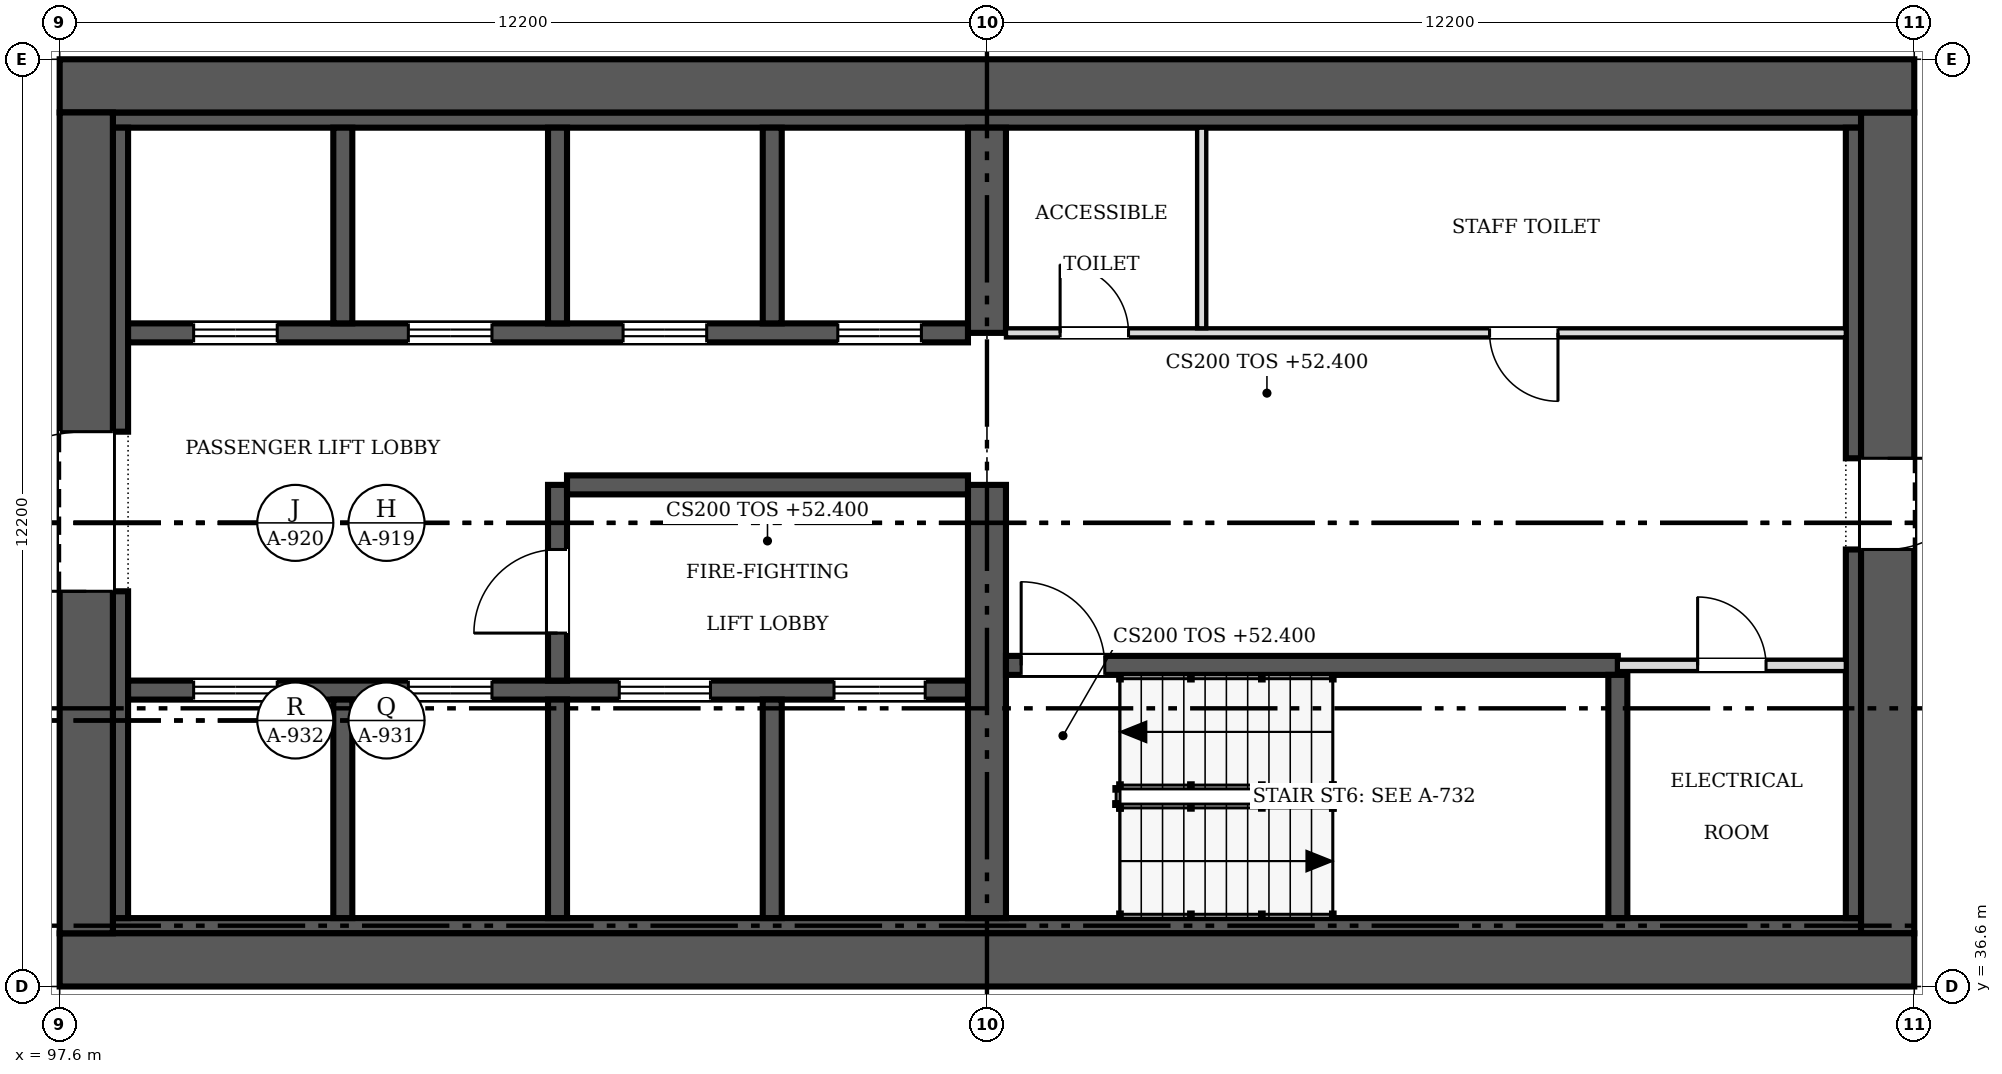
"""IFC4 building model, lengths in metres.
Left out: names, types, materials, properties, quantities, classifications, styles, units other than length and angle.
Written with IfcOpenShell. Run it as: python <this file> out.ifc"""

import sys

from ifc_helpers import new_model, si_unit, direction, frame, frame_2d, origin, place, context, subcontext, project, spatial, rectangle, extrude, source, transform, mapped, element, fill, save


model = new_model("IFC4")
c1 = context("Model", 3, precision=1e-05, world=origin(), true_north=direction((0.0, 1.0)))
c2 = subcontext(c1, "Body", "Model", "MODEL_VIEW")
j1 = project(units=[si_unit("LENGTHUNIT", "METRE"), si_unit("PLANEANGLEUNIT", "RADIAN")], contexts=[c1])
p1 = place(None, origin())
s1 = spatial("IfcSite", under=j1, at=p1, CompositionType="ELEMENT")
p2 = place(p1, origin())
s2 = spatial("IfcBuilding", under=s1, at=p2, CompositionType="ELEMENT")
p3 = place(p2, frame((0.0, 0.0, 52.4)))
s3 = spatial("IfcBuildingStorey", under=s2, at=p3, CompositionType="ELEMENT", Elevation=52.4)
p4 = place(p3, frame((122.0, 36.95, 0.0), z_axis=(0.0, 0.0, 1.0), x_axis=(-1.0, 0.0, 0.0)))
e1 = element("IfcWall", 1, at=p4, inside=s3, PredefinedType="SHEAR", context=c2, shape_type="SweptSolid", body=[
    extrude(rectangle(XDim=24.4, YDim=0.7, at=frame_2d((12.2, 0.0))), origin(), (0.0, 0.0, 1.0), 3.8),
])
p5 = place(p3, frame((97.95, 37.3, 0.0), z_axis=(0.0, 0.0, 1.0), x_axis=(0.0, 1.0, 0.0)))
e2 = element("IfcWall", 2, at=p5, inside=s3, PredefinedType="SHEAR", context=c2, shape_type="SweptSolid", body=[
    extrude(rectangle(XDim=10.8, YDim=0.7, at=frame_2d((5.4, 0.0))), origin(), (0.0, 0.0, 1.0), 3.8),
])
m1 = source(origin(), c2, "Body", "SweptSolid", [
    extrude(rectangle(XDim=2.1, YDim=2.4, at=frame_2d((1.05, 1.2))), frame((0.0, 0.36, 0.0), z_axis=(0.0, -1.0, 0.0), x_axis=(1.0, 0.0, 0.0)), (0.0, 0.0, 1.0), 0.72),
])
p6 = place(p5, frame((4.5, 0.0, 0.0)))
e3 = element("IfcOpeningElement", 3, at=p6, cuts=e2, PredefinedType="OPENING", context=c2, shape_type="MappedRepresentation", body=[
    mapped(m1, transform((0.0, 0.0, 0.0), scale=1.0)),
])
p7 = place(p3, frame((97.6, 48.45, 0.0), z_axis=(0.0, 0.0, 1.0), x_axis=(1.0, 0.0, 0.0)))
e4 = element("IfcWall", 4, at=p7, inside=s3, PredefinedType="SHEAR", context=c2, shape_type="SweptSolid", body=[
    extrude(rectangle(XDim=24.4, YDim=0.7, at=frame_2d((12.2, 0.0))), origin(), (0.0, 0.0, 1.0), 3.8),
])
p8 = place(p3, frame((121.65, 48.1, 0.0), z_axis=(0.0, 0.0, 1.0), x_axis=(0.0, -1.0, 0.0)))
e5 = element("IfcWall", 5, at=p8, inside=s3, PredefinedType="SHEAR", context=c2, shape_type="SweptSolid", body=[
    extrude(rectangle(XDim=10.8, YDim=0.7, at=frame_2d((5.4, 0.0))), origin(), (0.0, 0.0, 1.0), 3.8),
])
m2 = source(origin(), c2, "Body", "SweptSolid", [
    extrude(rectangle(XDim=1.2, YDim=2.1, at=frame_2d((0.6, 1.05))), frame((0.0, 0.36, 0.0), z_axis=(0.0, -1.0, 0.0), x_axis=(1.0, 0.0, 0.0)), (0.0, 0.0, 1.0), 0.72),
])
p9 = place(p8, frame((4.55, 0.0, 0.0)))
e6 = element("IfcOpeningElement", 6, at=p9, cuts=e5, PredefinedType="OPENING", context=c2, shape_type="MappedRepresentation", body=[
    mapped(m2, transform((0.0, 0.0, 0.0), scale=1.0)),
])
for number, where, z_axis, x_axis in (
    (7, (98.3, 37.4, 0.0), (0.0, 0.0, 1.0), (1.0, 0.0, 0.0)),
    (8, (98.3, 48.0, 0.0), (0.0, 0.0, 1.0), (1.0, 0.0, 0.0)),
):
    element("IfcWall", number, at=place(p3, frame(where, z_axis=z_axis, x_axis=x_axis)), inside=s3, PredefinedType="SOLIDWALL", context=c2, shape_type="SweptSolid", body=[
        extrude(rectangle(XDim=23.0, YDim=0.2, at=frame_2d((11.5, 0.0))), origin(), (0.0, 0.0, 1.0), 3.8),
    ])
p10 = place(p3, frame((98.4, 37.5, 0.0), z_axis=(0.0, 0.0, 1.0), x_axis=(0.0, 1.0, 0.0)))
e9 = element("IfcWall", 9, at=p10, inside=s3, PredefinedType="SOLIDWALL", context=c2, shape_type="SweptSolid", body=[
    extrude(rectangle(XDim=4.3, YDim=0.2, at=frame_2d((2.15, 0.0))), origin(), (0.0, 0.0, 1.0), 3.8),
])
p11 = place(p3, frame((98.4, 43.9, 0.0), z_axis=(0.0, 0.0, 1.0), x_axis=(0.0, 1.0, 0.0)))
e10 = element("IfcWall", 10, at=p11, inside=s3, PredefinedType="SOLIDWALL", context=c2, shape_type="SweptSolid", body=[
    extrude(rectangle(XDim=4.0, YDim=0.2, at=frame_2d((2.0, 0.0))), origin(), (0.0, 0.0, 1.0), 3.8),
])
p12 = place(p3, frame((121.2, 37.5, 0.0), z_axis=(0.0, 0.0, 1.0), x_axis=(0.0, 1.0, 0.0)))
e11 = element("IfcWall", 11, at=p12, inside=s3, PredefinedType="SOLIDWALL", context=c2, shape_type="SweptSolid", body=[
    extrude(rectangle(XDim=4.85, YDim=0.2, at=frame_2d((2.425, 0.0))), origin(), (0.0, 0.0, 1.0), 3.8),
])
p13 = place(p3, frame((121.2, 43.55, 0.0), z_axis=(0.0, 0.0, 1.0), x_axis=(0.0, 1.0, 0.0)))
e12 = element("IfcWall", 12, at=p13, inside=s3, PredefinedType="SOLIDWALL", context=c2, shape_type="SweptSolid", body=[
    extrude(rectangle(XDim=4.35, YDim=0.2, at=frame_2d((2.175, 0.0))), origin(), (0.0, 0.0, 1.0), 3.8),
])
p14 = place(p3, frame((109.8, 37.5, 0.0), z_axis=(0.0, 0.0, 1.0), x_axis=(0.0, 1.0, 0.0)))
e13 = element("IfcWall", 13, at=p14, inside=s3, PredefinedType="SHEAR", context=c2, shape_type="SweptSolid", body=[
    extrude(rectangle(XDim=5.7, YDim=0.5, at=frame_2d((2.85, 0.0))), origin(), (0.0, 0.0, 1.0), 3.8),
])
p15 = place(p3, frame((109.8, 45.2, 0.0), z_axis=(0.0, 0.0, 1.0), x_axis=(0.0, 1.0, 0.0)))
e14 = element("IfcWall", 14, at=p15, inside=s3, PredefinedType="SHEAR", context=c2, shape_type="SweptSolid", body=[
    extrude(rectangle(XDim=2.7, YDim=0.5, at=frame_2d((1.35, 0.0))), origin(), (0.0, 0.0, 1.0), 3.8),
])
p16 = place(p3, frame((98.5, 40.5, 0.0), z_axis=(0.0, 0.0, 1.0), x_axis=(1.0, 0.0, 0.0)))
e15 = element("IfcWall", 15, at=p16, inside=s3, PredefinedType="SOLIDWALL", context=c2, shape_type="SweptSolid", body=[
    extrude(rectangle(XDim=11.05, YDim=0.25, at=frame_2d((5.525, 0.0))), origin(), (0.0, 0.0, 1.0), 3.8),
])
m3 = source(origin(), c2, "Body", "SweptSolid", [
    extrude(rectangle(XDim=1.1, YDim=2.1, at=frame_2d((0.55, 1.05))), frame((0.0, 0.135, 0.0), z_axis=(0.0, -1.0, 0.0), x_axis=(1.0, 0.0, 0.0)), (0.0, 0.0, 1.0), 0.27),
])
p17 = place(p16, frame((0.863, 0.0, 0.0)))
e16 = element("IfcOpeningElement", 16, at=p17, cuts=e15, PredefinedType="OPENING", context=c2, shape_type="MappedRepresentation", body=[
    mapped(m3, transform((0.0, 0.0, 0.0), scale=1.0)),
])
p18 = place(p16, frame((3.688, 0.0, 0.0)))
e17 = element("IfcOpeningElement", 17, at=p18, cuts=e15, PredefinedType="OPENING", context=c2, shape_type="MappedRepresentation", body=[
    mapped(m3, transform((0.0, 0.0, 0.0), scale=1.0)),
])
m4 = source(origin(), c2, "Body", "SweptSolid", [
    extrude(rectangle(XDim=1.2, YDim=2.1, at=frame_2d((0.6, 1.05))), frame((0.0, 0.135, 0.0), z_axis=(0.0, -1.0, 0.0), x_axis=(1.0, 0.0, 0.0)), (0.0, 0.0, 1.0), 0.27),
])
p19 = place(p16, frame((6.462, 0.0, 0.0)))
e18 = element("IfcOpeningElement", 18, at=p19, cuts=e15, PredefinedType="OPENING", context=c2, shape_type="MappedRepresentation", body=[
    mapped(m4, transform((0.0, 0.0, 0.0), scale=1.0)),
])
p20 = place(p16, frame((9.288, 0.0, 0.0)))
e19 = element("IfcOpeningElement", 19, at=p20, cuts=e15, PredefinedType="OPENING", context=c2, shape_type="MappedRepresentation", body=[
    mapped(m4, transform((0.0, 0.0, 0.0), scale=1.0)),
])
p21 = place(p3, frame((109.55, 45.2, 0.0), z_axis=(0.0, 0.0, 1.0), x_axis=(-1.0, 0.0, 0.0)))
e20 = element("IfcWall", 20, at=p21, inside=s3, PredefinedType="SOLIDWALL", context=c2, shape_type="SweptSolid", body=[
    extrude(rectangle(XDim=11.05, YDim=0.25, at=frame_2d((5.525, 0.0))), origin(), (0.0, 0.0, 1.0), 3.8),
])
p22 = place(p21, frame((9.087, 0.0, 0.0)))
e21 = element("IfcOpeningElement", 21, at=p22, cuts=e20, PredefinedType="OPENING", context=c2, shape_type="MappedRepresentation", body=[
    mapped(m3, transform((0.0, 0.0, 0.0), scale=1.0)),
])
p23 = place(p21, frame((6.262, 0.0, 0.0)))
e22 = element("IfcOpeningElement", 22, at=p23, cuts=e20, PredefinedType="OPENING", context=c2, shape_type="MappedRepresentation", body=[
    mapped(m3, transform((0.0, 0.0, 0.0), scale=1.0)),
])
p24 = place(p21, frame((3.438, 0.0, 0.0)))
e23 = element("IfcOpeningElement", 23, at=p24, cuts=e20, PredefinedType="OPENING", context=c2, shape_type="MappedRepresentation", body=[
    mapped(m3, transform((0.0, 0.0, 0.0), scale=1.0)),
])
p25 = place(p21, frame((0.613, 0.0, 0.0)))
e24 = element("IfcOpeningElement", 24, at=p25, cuts=e20, PredefinedType="OPENING", context=c2, shape_type="MappedRepresentation", body=[
    mapped(m3, transform((0.0, 0.0, 0.0), scale=1.0)),
])
p26 = place(p3, frame((118.1, 40.825, 0.0), z_axis=(0.0, 0.0, 1.0), x_axis=(-1.0, 0.0, 0.0)))
e25 = element("IfcWall", 25, at=p26, inside=s3, PredefinedType="SOLIDWALL", context=c2, shape_type="SweptSolid", body=[
    extrude(rectangle(XDim=8.05, YDim=0.25, at=frame_2d((4.025, 0.0))), origin(), (0.0, 0.0, 1.0), 3.8),
])
p27 = place(p26, frame((6.75, 0.0, 0.0)))
e26 = element("IfcOpeningElement", 26, at=p27, cuts=e25, PredefinedType="OPENING", context=c2, shape_type="MappedRepresentation", body=[
    mapped(m3, transform((0.0, 0.0, 0.0), scale=1.0)),
])
p28 = place(p3, frame((104.15, 37.5, 0.0), z_axis=(0.0, 0.0, 1.0), x_axis=(0.0, 1.0, 0.0)))
e27 = element("IfcWall", 27, at=p28, inside=s3, PredefinedType="SOLIDWALL", context=c2, shape_type="SweptSolid", body=[
    extrude(rectangle(XDim=2.875, YDim=0.25, at=frame_2d((1.438, 0.0))), origin(), (0.0, 0.0, 1.0), 3.8),
])
p29 = place(p3, frame((104.15, 43.2, 0.0), z_axis=(0.0, 0.0, 1.0), x_axis=(0.0, -1.0, 0.0)))
e28 = element("IfcWall", 28, at=p29, inside=s3, PredefinedType="SOLIDWALL", context=c2, shape_type="SweptSolid", body=[
    extrude(rectangle(XDim=2.575, YDim=0.25, at=frame_2d((1.288, 0.0))), origin(), (0.0, 0.0, 1.0), 3.8),
])
p30 = place(p29, frame((0.85, 0.0, 0.0)))
e29 = element("IfcOpeningElement", 29, at=p30, cuts=e28, PredefinedType="OPENING", context=c2, shape_type="MappedRepresentation", body=[
    mapped(m3, transform((0.0, 0.0, 0.0), scale=1.0)),
])
p31 = place(p3, frame((104.275, 43.2, 0.0), z_axis=(0.0, 0.0, 1.0), x_axis=(1.0, 0.0, 0.0)))
e30 = element("IfcWall", 30, at=p31, inside=s3, PredefinedType="SOLIDWALL", context=c2, shape_type="SweptSolid", body=[
    extrude(rectangle(XDim=5.275, YDim=0.25, at=frame_2d((2.638, 0.0))), origin(), (0.0, 0.0, 1.0), 3.8),
])
p32 = place(p3, frame((118.1, 37.5, 0.0), z_axis=(0.0, 0.0, 1.0), x_axis=(0.0, 1.0, 0.0)))
e31 = element("IfcWall", 31, at=p32, inside=s3, PredefinedType="SOLIDWALL", context=c2, shape_type="SweptSolid", body=[
    extrude(rectangle(XDim=3.2, YDim=0.25, at=frame_2d((1.6, 0.0))), origin(), (0.0, 0.0, 1.0), 3.8),
])
for number, where, z_axis, x_axis in (
    (32, (101.325, 37.5, 0.0), (0.0, 0.0, 1.0), (0.0, 1.0, 0.0)),
    (33, (106.975, 37.5, 0.0), (0.0, 0.0, 1.0), (0.0, 1.0, 0.0)),
):
    element("IfcWall", number, at=place(p3, frame(where, z_axis=z_axis, x_axis=x_axis)), inside=s3, PredefinedType="SOLIDWALL", context=c2, shape_type="SweptSolid", body=[
        extrude(rectangle(XDim=2.875, YDim=0.25, at=frame_2d((1.438, 0.0))), origin(), (0.0, 0.0, 1.0), 3.8),
    ])
for number, where, z_axis, x_axis in (
    (34, (101.325, 45.325, 0.0), (0.0, 0.0, 1.0), (0.0, 1.0, 0.0)),
    (35, (104.15, 45.325, 0.0), (0.0, 0.0, 1.0), (0.0, 1.0, 0.0)),
    (36, (106.975, 45.325, 0.0), (0.0, 0.0, 1.0), (0.0, 1.0, 0.0)),
):
    element("IfcWall", number, at=place(p3, frame(where, z_axis=z_axis, x_axis=x_axis)), inside=s3, PredefinedType="SOLIDWALL", context=c2, shape_type="SweptSolid", body=[
        extrude(rectangle(XDim=2.575, YDim=0.25, at=frame_2d((1.288, 0.0))), origin(), (0.0, 0.0, 1.0), 3.8),
    ])
p33 = place(p3, frame((110.05, 45.2, 0.0), z_axis=(0.0, 0.0, 1.0), x_axis=(1.0, 0.0, 0.0)))
e37 = element("IfcWall", 37, at=p33, inside=s3, PredefinedType="PARTITIONING", context=c2, shape_type="SweptSolid", body=[
    extrude(rectangle(XDim=11.05, YDim=0.12, at=frame_2d((5.525, 0.0))), origin(), (0.0, 0.0, 1.0), 3.6),
])
m5 = source(origin(), c2, "Body", "SweptSolid", [
    extrude(rectangle(XDim=0.9, YDim=2.1, at=frame_2d((0.45, 1.05))), frame((0.0, 0.07, 0.0), z_axis=(0.0, -1.0, 0.0), x_axis=(1.0, 0.0, 0.0)), (0.0, 0.0, 1.0), 0.14),
])
p34 = place(p33, frame((0.712, 0.0, 0.0)))
e38 = element("IfcOpeningElement", 38, at=p34, cuts=e37, PredefinedType="OPENING", context=c2, shape_type="MappedRepresentation", body=[
    mapped(m5, transform((0.0, 0.0, 0.0), scale=1.0)),
])
p35 = place(p33, frame((6.363, 0.0, 0.0)))
e39 = element("IfcOpeningElement", 39, at=p35, cuts=e37, PredefinedType="OPENING", context=c2, shape_type="MappedRepresentation", body=[
    mapped(m5, transform((0.0, 0.0, 0.0), scale=1.0)),
])
p36 = place(p3, frame((121.1, 40.825, 0.0), z_axis=(0.0, 0.0, 1.0), x_axis=(-1.0, 0.0, 0.0)))
e40 = element("IfcWall", 40, at=p36, inside=s3, PredefinedType="PARTITIONING", context=c2, shape_type="SweptSolid", body=[
    extrude(rectangle(XDim=3.0, YDim=0.15, at=frame_2d((1.5, 0.0))), origin(), (0.0, 0.0, 1.0), 3.6),
])
m6 = source(origin(), c2, "Body", "SweptSolid", [
    extrude(rectangle(XDim=0.9, YDim=2.1, at=frame_2d((0.45, 1.05))), frame((0.0, 0.085, 0.0), z_axis=(0.0, -1.0, 0.0), x_axis=(1.0, 0.0, 0.0)), (0.0, 0.0, 1.0), 0.17),
])
p37 = place(p36, frame((1.05, 0.0, 0.0)))
e41 = element("IfcOpeningElement", 41, at=p37, cuts=e40, PredefinedType="OPENING", context=c2, shape_type="MappedRepresentation", body=[
    mapped(m6, transform((0.0, 0.0, 0.0), scale=1.0)),
])
p38 = place(p3, frame((112.625, 45.26, 0.0), z_axis=(0.0, 0.0, 1.0), x_axis=(0.0, 1.0, 0.0)))
e42 = element("IfcWall", 42, at=p38, inside=s3, PredefinedType="PARTITIONING", context=c2, shape_type="SweptSolid", body=[
    extrude(rectangle(XDim=2.64, YDim=0.12, at=frame_2d((1.32, 0.0))), origin(), (0.0, 0.0, 1.0), 3.6),
])
m7 = source(origin(), c2, "Body", "SweptSolid", [
    extrude(rectangle(XDim=2.1, YDim=2.4, at=frame_2d((1.05, 1.2))), frame((0.0, 0.025, 0.0), z_axis=(0.0, -1.0, 0.0), x_axis=(1.0, 0.0, 0.0)), (0.0, 0.0, 1.0), 0.05),
])
p39 = place(p6, origin())
e43 = element("IfcDoor", 43, at=p39, inside=s3, OperationType="DOUBLE_DOOR_SINGLE_SWING", PredefinedType="DOOR", context=c2, shape_type="MappedRepresentation", body=[
    mapped(m7, transform((0.0, 0.0, 0.0), scale=1.0)),
])
fill(e3, e43)
m8 = source(origin(), c2, "Body", "SweptSolid", [
    extrude(rectangle(XDim=1.2, YDim=2.1, at=frame_2d((0.6, 1.05))), frame((0.0, 0.025, 0.0), z_axis=(0.0, -1.0, 0.0), x_axis=(1.0, 0.0, 0.0)), (0.0, 0.0, 1.0), 0.05),
])
p40 = place(p9, origin())
e44 = element("IfcDoor", 44, at=p40, inside=s3, OperationType="SINGLE_SWING_LEFT", PredefinedType="DOOR", context=c2, shape_type="MappedRepresentation", body=[
    mapped(m8, transform((0.0, 0.0, 0.0), scale=1.0)),
])
fill(e6, e44)
m9 = source(origin(), c2, "Body", "SweptSolid", [
    extrude(rectangle(XDim=1.1, YDim=2.1, at=frame_2d((0.55, 1.05))), frame((0.0, 0.025, 0.0), z_axis=(0.0, -1.0, 0.0), x_axis=(1.0, 0.0, 0.0)), (0.0, 0.0, 1.0), 0.05),
])
p41 = place(p17, origin())
e45 = element("IfcDoor", 45, at=p41, inside=s3, OperationType="DOUBLE_DOOR_SLIDING", PredefinedType="DOOR", context=c2, shape_type="MappedRepresentation", body=[
    mapped(m9, transform((0.0, 0.0, 0.0), scale=1.0)),
])
fill(e16, e45)
p42 = place(p18, origin())
e46 = element("IfcDoor", 46, at=p42, inside=s3, OperationType="DOUBLE_DOOR_SLIDING", PredefinedType="DOOR", context=c2, shape_type="MappedRepresentation", body=[
    mapped(m9, transform((0.0, 0.0, 0.0), scale=1.0)),
])
fill(e17, e46)
p43 = place(p19, origin())
e47 = element("IfcDoor", 47, at=p43, inside=s3, OperationType="DOUBLE_DOOR_SLIDING", PredefinedType="DOOR", context=c2, shape_type="MappedRepresentation", body=[
    mapped(m8, transform((0.0, 0.0, 0.0), scale=1.0)),
])
fill(e18, e47)
p44 = place(p20, origin())
e48 = element("IfcDoor", 48, at=p44, inside=s3, OperationType="DOUBLE_DOOR_SLIDING", PredefinedType="DOOR", context=c2, shape_type="MappedRepresentation", body=[
    mapped(m8, transform((0.0, 0.0, 0.0), scale=1.0)),
])
fill(e19, e48)
p45 = place(p22, origin())
e49 = element("IfcDoor", 49, at=p45, inside=s3, OperationType="DOUBLE_DOOR_SLIDING", PredefinedType="DOOR", context=c2, shape_type="MappedRepresentation", body=[
    mapped(m9, transform((0.0, 0.0, 0.0), scale=1.0)),
])
fill(e21, e49)
p46 = place(p23, origin())
e50 = element("IfcDoor", 50, at=p46, inside=s3, OperationType="DOUBLE_DOOR_SLIDING", PredefinedType="DOOR", context=c2, shape_type="MappedRepresentation", body=[
    mapped(m9, transform((0.0, 0.0, 0.0), scale=1.0)),
])
fill(e22, e50)
p47 = place(p24, origin())
e51 = element("IfcDoor", 51, at=p47, inside=s3, OperationType="DOUBLE_DOOR_SLIDING", PredefinedType="DOOR", context=c2, shape_type="MappedRepresentation", body=[
    mapped(m9, transform((0.0, 0.0, 0.0), scale=1.0)),
])
fill(e23, e51)
p48 = place(p25, origin())
e52 = element("IfcDoor", 52, at=p48, inside=s3, OperationType="DOUBLE_DOOR_SLIDING", PredefinedType="DOOR", context=c2, shape_type="MappedRepresentation", body=[
    mapped(m9, transform((0.0, 0.0, 0.0), scale=1.0)),
])
fill(e24, e52)
p49 = place(p27, origin())
e53 = element("IfcDoor", 53, at=p49, inside=s3, OperationType="SINGLE_SWING_RIGHT", PredefinedType="DOOR", context=c2, shape_type="MappedRepresentation", body=[
    mapped(m9, transform((0.0, 0.0, 0.0), scale=1.0)),
])
fill(e26, e53)
p50 = place(p30, origin())
e54 = element("IfcDoor", 54, at=p50, inside=s3, OperationType="SINGLE_SWING_RIGHT", PredefinedType="DOOR", context=c2, shape_type="MappedRepresentation", body=[
    mapped(m9, transform((0.0, 0.0, 0.0), scale=1.0)),
])
fill(e29, e54)
m10 = source(origin(), c2, "Body", "SweptSolid", [
    extrude(rectangle(XDim=0.9, YDim=2.1, at=frame_2d((0.45, 1.05))), frame((0.0, 0.025, 0.0), z_axis=(0.0, -1.0, 0.0), x_axis=(1.0, 0.0, 0.0)), (0.0, 0.0, 1.0), 0.05),
])
p51 = place(p34, origin())
e55 = element("IfcDoor", 55, at=p51, inside=s3, OperationType="SINGLE_SWING_LEFT", PredefinedType="DOOR", context=c2, shape_type="MappedRepresentation", body=[
    mapped(m10, transform((0.0, 0.0, 0.0), scale=1.0)),
])
fill(e38, e55)
p52 = place(p35, origin())
e56 = element("IfcDoor", 56, at=p52, inside=s3, OperationType="SINGLE_SWING_RIGHT", PredefinedType="DOOR", context=c2, shape_type="MappedRepresentation", body=[
    mapped(m10, transform((0.0, 0.0, 0.0), scale=1.0)),
])
fill(e39, e56)
p53 = place(p37, origin())
e57 = element("IfcDoor", 57, at=p53, inside=s3, OperationType="SINGLE_SWING_RIGHT", PredefinedType="DOOR", context=c2, shape_type="MappedRepresentation", body=[
    mapped(m10, transform((0.0, 0.0, 0.0), scale=1.0)),
])
fill(e41, e57)
save(model, sys.argv[1])
